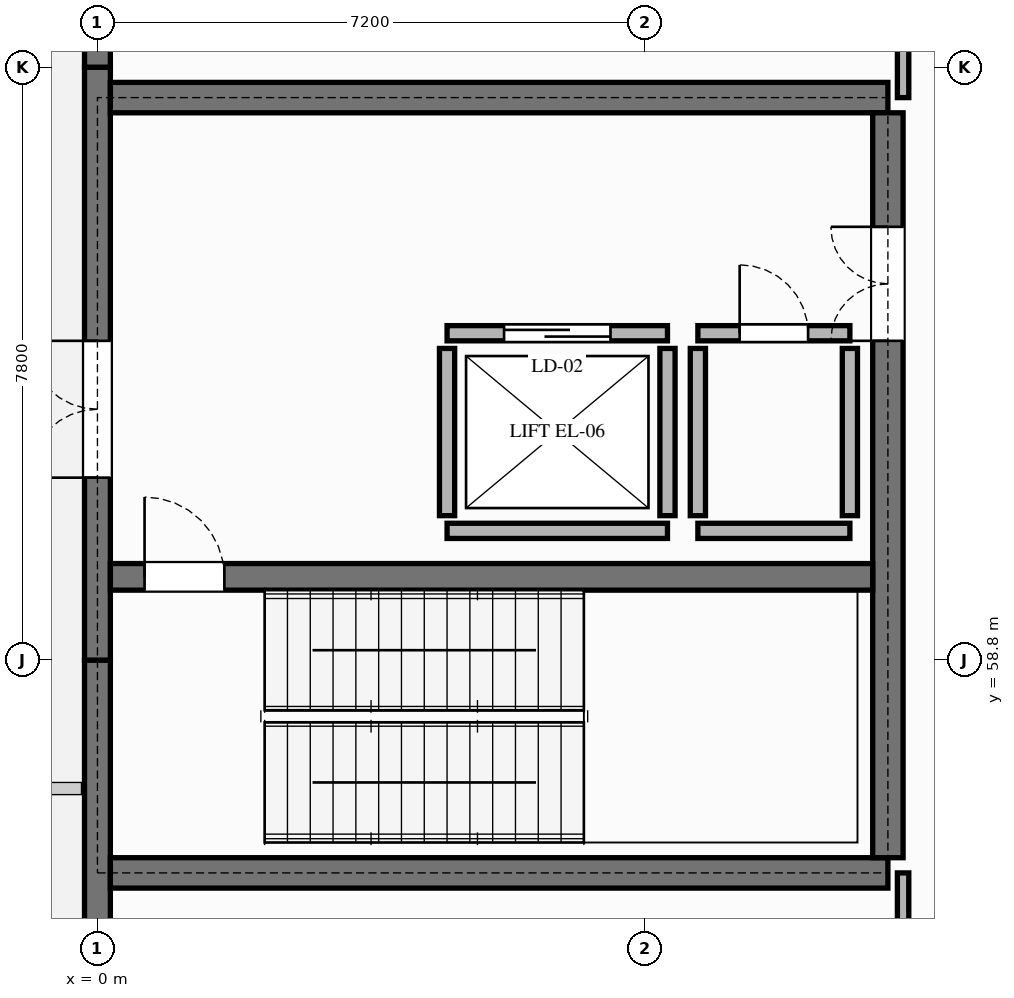
"""IFC4 building model, lengths in metres.
Left out: names, types, materials, properties, quantities, classifications, styles, units other than length and angle.
Written with IfcOpenShell. Run it as: python <this file> out.ifc"""

import sys

from ifc_helpers import new_model, si_unit, direction, frame, frame_2d, origin, place, context, subcontext, project, spatial, rectangle, extrude, element, fill, save


model = new_model("IFC4")
c1 = context("Model", 3, precision=1e-05, world=origin(), true_north=direction((0.0, 1.0)))
c2 = subcontext(c1, "Body", "Model", "MODEL_VIEW")
j1 = project(units=[si_unit("LENGTHUNIT", "METRE"), si_unit("PLANEANGLEUNIT", "RADIAN")], contexts=[c1])
p1 = place(None, origin())
s1 = spatial("IfcSite", under=j1, at=p1, CompositionType="ELEMENT")
p2 = place(p1, origin())
s2 = spatial("IfcBuilding", under=s1, at=p2, CompositionType="ELEMENT")
p3 = place(p2, origin())
s3 = spatial("IfcBuildingStorey", under=s2, at=p3, CompositionType="ELEMENT", Elevation=0.0)
p4 = place(p3, frame((0.0, 51.0, 0.0), z_axis=(0.0, 0.0, 1.0), x_axis=(0.0, 1.0, 0.0)))
e1 = element("IfcWall", 1, at=p4, inside=s3, PredefinedType="SOLIDWALL", context=c2, shape_type="SweptSolid", body=[
    extrude(rectangle(XDim=7.8, YDim=0.34, at=frame_2d((3.9, 0.0))), origin(), (0.0, 0.0, 1.0), 4.8),
])
p5 = place(p4, frame((1.5, 0.0, 0.85)))
e2 = element("IfcOpeningElement", 2, at=p5, cuts=e1, PredefinedType="OPENING", context=c2, shape_type="SweptSolid", body=[
    extrude(rectangle(XDim=1.65, YDim=2.25, at=frame_2d((0.825, 1.125))), frame((0.0, 0.18, 0.0), z_axis=(0.0, -1.0, 0.0), x_axis=(1.0, 0.0, 0.0)), (0.0, 0.0, 1.0), 0.36),
])
p6 = place(p3, frame((0.0, 58.8, 0.0), z_axis=(0.0, 0.0, 1.0), x_axis=(0.0, 1.0, 0.0)))
e3 = element("IfcWall", 3, at=p6, inside=s3, PredefinedType="SOLIDWALL", context=c2, shape_type="SweptSolid", body=[
    extrude(rectangle(XDim=7.8, YDim=0.34, at=frame_2d((3.9, 0.0))), origin(), (0.0, 0.0, 1.0), 4.8),
])
p7 = place(p6, frame((2.4, 0.0, 0.0)))
e4 = element("IfcOpeningElement", 4, at=p7, cuts=e3, PredefinedType="OPENING", context=c2, shape_type="SweptSolid", body=[
    extrude(rectangle(XDim=1.8, YDim=2.4, at=frame_2d((0.9, 1.2))), frame((0.0, 0.18, 0.0), z_axis=(0.0, -1.0, 0.0), x_axis=(1.0, 0.0, 0.0)), (0.0, 0.0, 1.0), 0.36),
])
p8 = place(p3, frame((0.0, 66.6, 0.0), z_axis=(0.0, 0.0, 1.0), x_axis=(0.0, 1.0, 0.0)))
e5 = element("IfcWall", 5, at=p8, inside=s3, PredefinedType="SOLIDWALL", context=c2, shape_type="SweptSolid", body=[
    extrude(rectangle(XDim=7.8, YDim=0.34, at=frame_2d((3.9, 0.0))), origin(), (0.0, 0.0, 1.0), 4.8),
])
p9 = place(p8, frame((1.5, 0.0, 0.85)))
e6 = element("IfcOpeningElement", 6, at=p9, cuts=e5, PredefinedType="OPENING", context=c2, shape_type="SweptSolid", body=[
    extrude(rectangle(XDim=1.65, YDim=2.25, at=frame_2d((0.825, 1.125))), frame((0.0, 0.18, 0.0), z_axis=(0.0, -1.0, 0.0), x_axis=(1.0, 0.0, 0.0)), (0.0, 0.0, 1.0), 0.36),
])
p10 = place(p8, frame((4.3, 0.0, 0.85)))
e7 = element("IfcOpeningElement", 7, at=p10, cuts=e5, PredefinedType="OPENING", context=c2, shape_type="SweptSolid", body=[
    extrude(rectangle(XDim=1.65, YDim=2.25, at=frame_2d((0.825, 1.125))), frame((0.0, 0.18, 0.0), z_axis=(0.0, -1.0, 0.0), x_axis=(1.0, 0.0, 0.0)), (0.0, 0.0, 1.0), 0.36),
])
for number, where, z_axis, x_axis in (
    (8, (0.17, 56.0, 0.0), (0.0, 0.0, 1.0), (1.0, 0.0, 0.0)),
    (9, (0.17, 66.2, 0.0), (0.0, 0.0, 1.0), (1.0, 0.0, 0.0)),
):
    element("IfcWall", number, at=place(p3, frame(where, z_axis=z_axis, x_axis=x_axis)), inside=s3, PredefinedType="SHEAR", context=c2, shape_type="SweptSolid", body=[
        extrude(rectangle(XDim=10.23, YDim=0.4, at=frame_2d((5.115, 0.0))), origin(), (0.0, 0.0, 1.0), 4.8),
    ])
p11 = place(p3, frame((10.4, 56.2, 0.0), z_axis=(0.0, 0.0, 1.0), x_axis=(0.0, 1.0, 0.0)))
e10 = element("IfcWall", 10, at=p11, inside=s3, PredefinedType="SHEAR", context=c2, shape_type="SweptSolid", body=[
    extrude(rectangle(XDim=9.8, YDim=0.4, at=frame_2d((4.9, 0.0))), origin(), (0.0, 0.0, 1.0), 4.8),
])
p12 = place(p11, frame((6.8, 0.0, 0.0)))
e11 = element("IfcOpeningElement", 11, at=p12, cuts=e10, PredefinedType="OPENING", context=c2, shape_type="SweptSolid", body=[
    extrude(rectangle(XDim=1.5, YDim=2.2, at=frame_2d((0.75, 1.1))), frame((0.0, 0.21, 0.0), z_axis=(0.0, -1.0, 0.0), x_axis=(1.0, 0.0, 0.0)), (0.0, 0.0, 1.0), 0.42),
])
p13 = place(p3, frame((0.17, 59.895, 0.0), z_axis=(0.0, 0.0, 1.0), x_axis=(1.0, 0.0, 0.0)))
e12 = element("IfcWall", 12, at=p13, inside=s3, PredefinedType="SHEAR", context=c2, shape_type="SweptSolid", body=[
    extrude(rectangle(XDim=10.03, YDim=0.35, at=frame_2d((5.015, 0.0))), origin(), (0.0, 0.0, 1.0), 4.8),
])
p14 = place(p13, frame((0.45, 0.0, 0.0)))
e13 = element("IfcOpeningElement", 13, at=p14, cuts=e12, PredefinedType="OPENING", context=c2, shape_type="SweptSolid", body=[
    extrude(rectangle(XDim=1.05, YDim=2.2, at=frame_2d((0.525, 1.1))), frame((0.0, 0.185, 0.0), z_axis=(0.0, -1.0, 0.0), x_axis=(1.0, 0.0, 0.0)), (0.0, 0.0, 1.0), 0.37),
])
p15 = place(p3, frame((4.6, 60.5, 0.0), z_axis=(0.0, 0.0, 1.0), x_axis=(1.0, 0.0, 0.0)))
e14 = element("IfcWall", 14, at=p15, inside=s3, PredefinedType="PARTITIONING", context=c2, shape_type="SweptSolid", body=[
    extrude(rectangle(XDim=2.9, YDim=0.2, at=frame_2d((1.45, 0.0))), origin(), (0.0, 0.0, 1.0), 4.8),
])
p16 = place(p3, frame((4.6, 63.1, 0.0), z_axis=(0.0, 0.0, 1.0), x_axis=(1.0, 0.0, 0.0)))
e15 = element("IfcWall", 15, at=p16, inside=s3, PredefinedType="PARTITIONING", context=c2, shape_type="SweptSolid", body=[
    extrude(rectangle(XDim=2.9, YDim=0.2, at=frame_2d((1.45, 0.0))), origin(), (0.0, 0.0, 1.0), 4.8),
])
p17 = place(p16, frame((0.75, 0.0, 0.0)))
e16 = element("IfcOpeningElement", 16, at=p17, cuts=e15, PredefinedType="OPENING", context=c2, shape_type="SweptSolid", body=[
    extrude(rectangle(XDim=1.4, YDim=2.25, at=frame_2d((0.7, 1.125))), frame((0.0, 0.11, 0.0), z_axis=(0.0, -1.0, 0.0), x_axis=(1.0, 0.0, 0.0)), (0.0, 0.0, 1.0), 0.22),
])
for number, where, z_axis, x_axis in (
    (17, (4.6, 60.7, 0.0), (0.0, 0.0, 1.0), (0.0, 1.0, 0.0)),
    (18, (7.5, 60.7, 0.0), (0.0, 0.0, 1.0), (0.0, 1.0, 0.0)),
):
    element("IfcWall", number, at=place(p3, frame(where, z_axis=z_axis, x_axis=x_axis)), inside=s3, PredefinedType="PARTITIONING", context=c2, shape_type="SweptSolid", body=[
        extrude(rectangle(XDim=2.2, YDim=0.2, at=frame_2d((1.1, 0.0))), origin(), (0.0, 0.0, 1.0), 4.8),
    ])
p18 = place(p3, frame((7.9, 60.5, 0.0), z_axis=(0.0, 0.0, 1.0), x_axis=(1.0, 0.0, 0.0)))
e19 = element("IfcWall", 19, at=p18, inside=s3, PredefinedType="PARTITIONING", context=c2, shape_type="SweptSolid", body=[
    extrude(rectangle(XDim=2.0, YDim=0.2, at=frame_2d((1.0, 0.0))), origin(), (0.0, 0.0, 1.0), 4.8),
])
p19 = place(p3, frame((7.9, 63.1, 0.0), z_axis=(0.0, 0.0, 1.0), x_axis=(1.0, 0.0, 0.0)))
e20 = element("IfcWall", 20, at=p19, inside=s3, PredefinedType="PARTITIONING", context=c2, shape_type="SweptSolid", body=[
    extrude(rectangle(XDim=2.0, YDim=0.2, at=frame_2d((1.0, 0.0))), origin(), (0.0, 0.0, 1.0), 4.8),
])
p20 = place(p19, frame((0.55, 0.0, 0.0)))
e21 = element("IfcOpeningElement", 21, at=p20, cuts=e20, PredefinedType="OPENING", context=c2, shape_type="SweptSolid", body=[
    extrude(rectangle(XDim=0.9, YDim=2.1, at=frame_2d((0.45, 1.05))), frame((0.0, 0.11, 0.0), z_axis=(0.0, -1.0, 0.0), x_axis=(1.0, 0.0, 0.0)), (0.0, 0.0, 1.0), 0.22),
])
for number, where, z_axis, x_axis in (
    (22, (7.9, 60.7, 0.0), (0.0, 0.0, 1.0), (0.0, 1.0, 0.0)),
    (23, (9.9, 60.7, 0.0), (0.0, 0.0, 1.0), (0.0, 1.0, 0.0)),
):
    element("IfcWall", number, at=place(p3, frame(where, z_axis=z_axis, x_axis=x_axis)), inside=s3, PredefinedType="PARTITIONING", context=c2, shape_type="SweptSolid", body=[
        extrude(rectangle(XDim=2.2, YDim=0.2, at=frame_2d((1.1, 0.0))), origin(), (0.0, 0.0, 1.0), 4.8),
    ])
p21 = place(p3, frame((10.6, 28.8, 0.0), z_axis=(0.0, 0.0, 1.0), x_axis=(0.0, 1.0, 0.0)))
e24 = element("IfcWall", 24, at=p21, inside=s3, PredefinedType="PARTITIONING", context=c2, shape_type="SweptSolid", body=[
    extrude(rectangle(XDim=27.2, YDim=0.15, at=frame_2d((13.6, 0.0))), origin(), (0.0, 0.0, 1.0), 4.459),
])
p22 = place(p21, frame((11.0, 0.0, 0.0)))
e25 = element("IfcOpeningElement", 25, at=p22, cuts=e24, PredefinedType="OPENING", context=c2, shape_type="SweptSolid", body=[
    extrude(rectangle(XDim=1.0, YDim=2.15, at=frame_2d((0.5, 1.075))), frame((0.0, 0.085, 0.0), z_axis=(0.0, -1.0, 0.0), x_axis=(1.0, 0.0, 0.0)), (0.0, 0.0, 1.0), 0.17),
])
p23 = place(p3, frame((10.6, 66.2, 0.0), z_axis=(0.0, 0.0, 1.0), x_axis=(0.0, 1.0, 0.0)))
e26 = element("IfcWall", 26, at=p23, inside=s3, PredefinedType="PARTITIONING", context=c2, shape_type="SweptSolid", body=[
    extrude(rectangle(XDim=16.0, YDim=0.15, at=frame_2d((8.0, 0.0))), origin(), (0.0, 0.0, 1.0), 4.8),
])
p24 = place(p23, frame((6.5, 0.0, 0.0)))
e27 = element("IfcOpeningElement", 27, at=p24, cuts=e26, PredefinedType="OPENING", context=c2, shape_type="SweptSolid", body=[
    extrude(rectangle(XDim=1.0, YDim=2.15, at=frame_2d((0.5, 1.075))), frame((0.0, 0.085, 0.0), z_axis=(0.0, -1.0, 0.0), x_axis=(1.0, 0.0, 0.0)), (0.0, 0.0, 1.0), 0.17),
])
p25 = place(p7, origin())
e28 = element("IfcDoor", 28, at=p25, inside=s3, OperationType="DOUBLE_DOOR_SINGLE_SWING", PredefinedType="DOOR", context=c2, shape_type="SweptSolid", body=[
    extrude(rectangle(XDim=1.8, YDim=2.4, at=frame_2d((0.9, 1.2))), frame((0.0, 0.025, 0.0), z_axis=(0.0, -1.0, 0.0), x_axis=(1.0, 0.0, 0.0)), (0.0, 0.0, 1.0), 0.05),
])
fill(e4, e28)
p26 = place(p12, origin())
e29 = element("IfcDoor", 29, at=p26, inside=s3, OperationType="DOUBLE_DOOR_SINGLE_SWING", PredefinedType="DOOR", context=c2, shape_type="SweptSolid", body=[
    extrude(rectangle(XDim=1.5, YDim=2.2, at=frame_2d((0.75, 1.1))), frame((0.0, 0.025, 0.0), z_axis=(0.0, -1.0, 0.0), x_axis=(1.0, 0.0, 0.0)), (0.0, 0.0, 1.0), 0.05),
])
fill(e11, e29)
p27 = place(p14, origin())
e30 = element("IfcDoor", 30, at=p27, inside=s3, OperationType="SINGLE_SWING_LEFT", PredefinedType="DOOR", context=c2, shape_type="SweptSolid", body=[
    extrude(rectangle(XDim=1.05, YDim=2.2, at=frame_2d((0.525, 1.1))), frame((0.0, 0.025, 0.0), z_axis=(0.0, -1.0, 0.0), x_axis=(1.0, 0.0, 0.0)), (0.0, 0.0, 1.0), 0.05),
])
fill(e13, e30)
p28 = place(p17, origin())
e31 = element("IfcDoor", 31, at=p28, inside=s3, OperationType="SLIDING_TO_LEFT", PredefinedType="DOOR", context=c2, shape_type="SweptSolid", body=[
    extrude(rectangle(XDim=1.4, YDim=2.25, at=frame_2d((0.7, 1.125))), frame((0.0, 0.025, 0.0), z_axis=(0.0, -1.0, 0.0), x_axis=(1.0, 0.0, 0.0)), (0.0, 0.0, 1.0), 0.05),
])
fill(e16, e31)
p29 = place(p20, origin())
e32 = element("IfcDoor", 32, at=p29, inside=s3, OperationType="SINGLE_SWING_LEFT", PredefinedType="DOOR", context=c2, shape_type="SweptSolid", body=[
    extrude(rectangle(XDim=0.9, YDim=2.1, at=frame_2d((0.45, 1.05))), frame((0.0, 0.025, 0.0), z_axis=(0.0, -1.0, 0.0), x_axis=(1.0, 0.0, 0.0)), (0.0, 0.0, 1.0), 0.05),
])
fill(e21, e32)
save(model, sys.argv[1])
